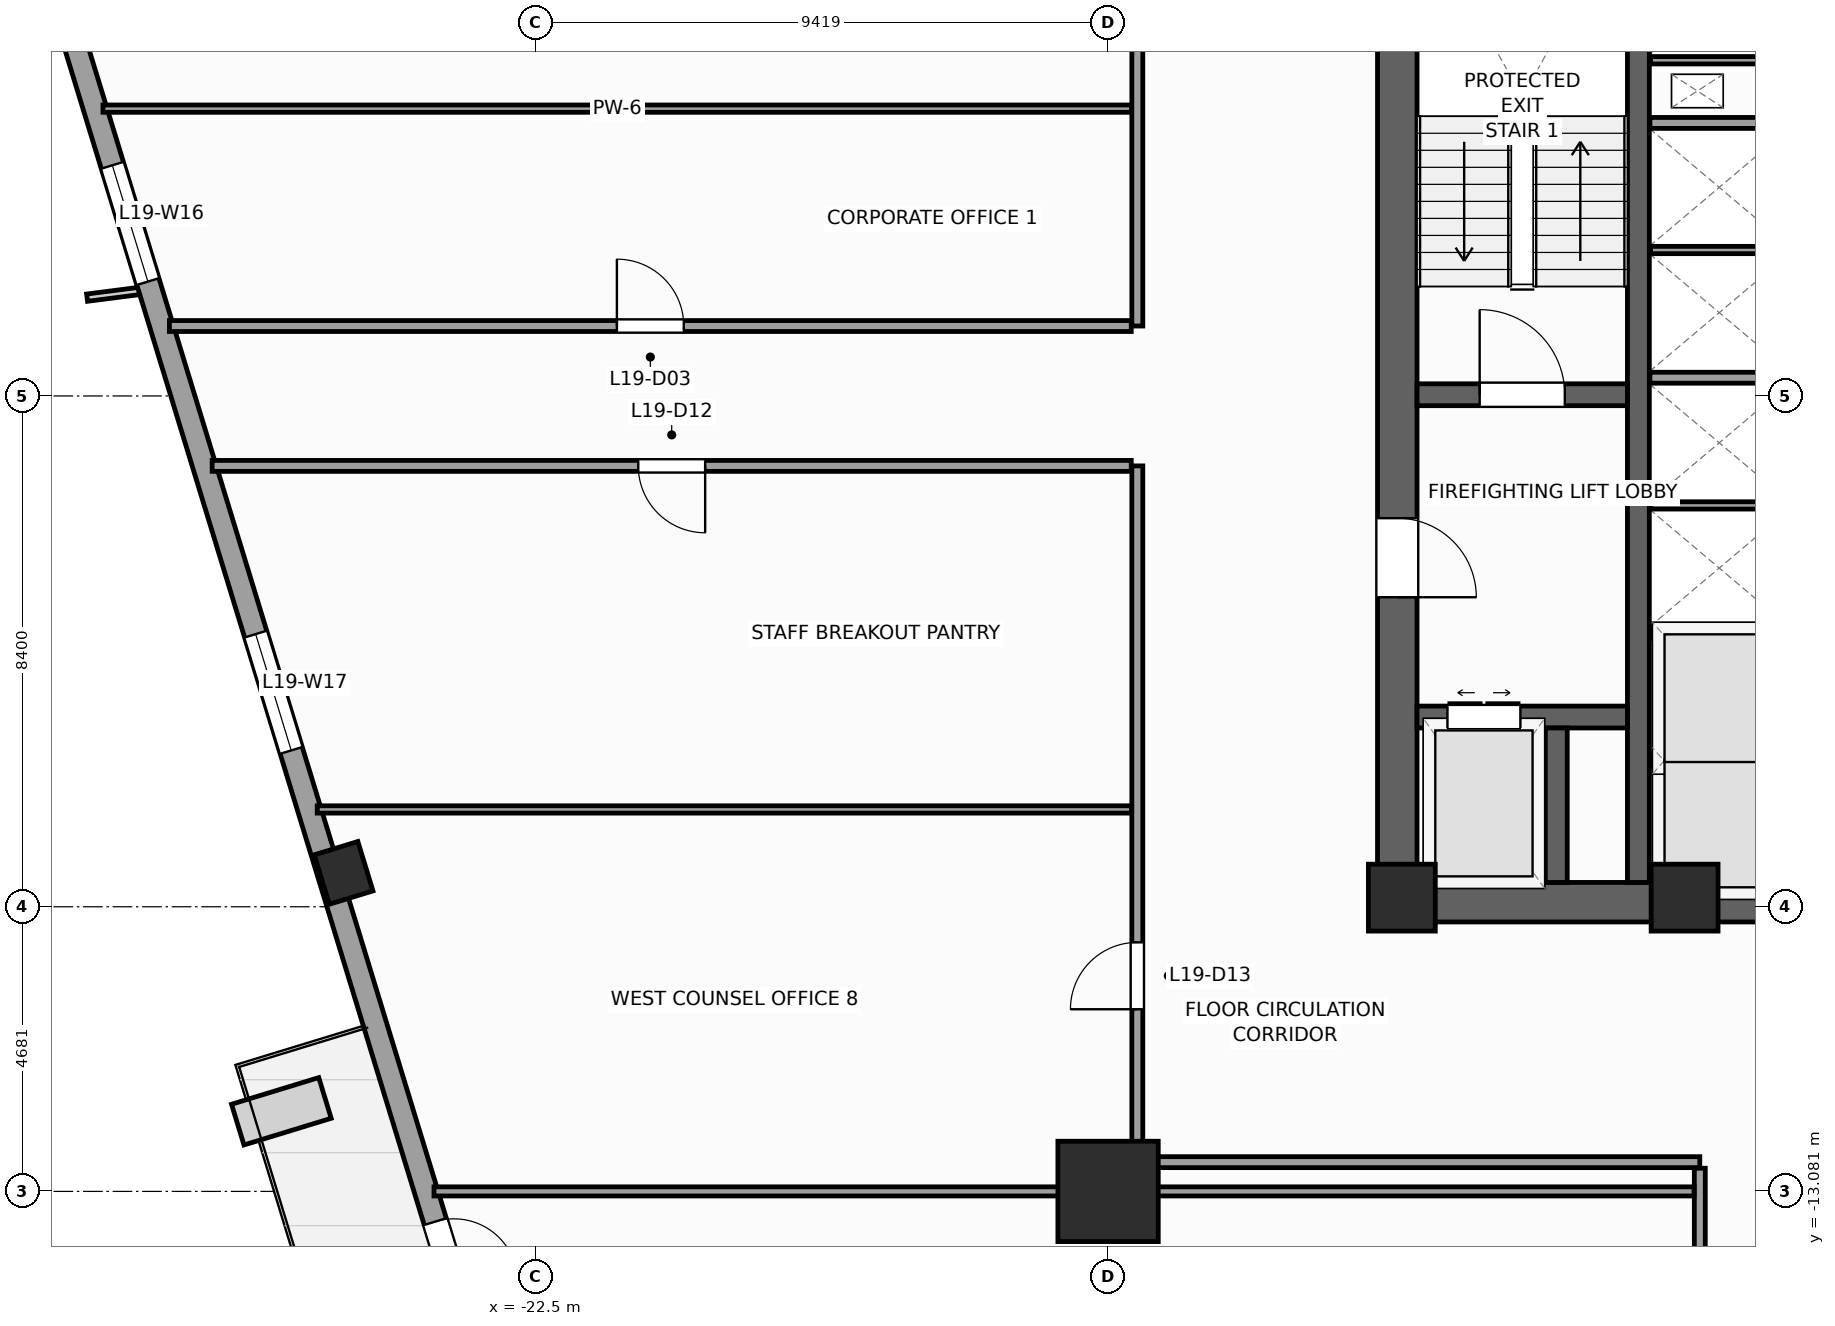
"""IFC4 building model, lengths in metres.
Left out: names, types, materials, properties, quantities, classifications, styles, units other than length and angle.
Written with IfcOpenShell. Run it as: python <this file> out.ifc"""

import sys

from ifc_helpers import new_model, si_unit, direction, frame, frame_2d, origin, origin_2d, place, context, subcontext, project, spatial, rectangle, extrude, source, transform, mapped, element, fill, save


model = new_model("IFC4")
c1 = context("Model", 3, precision=1e-05, world=origin(), true_north=direction((0.0, 1.0)))
c2 = subcontext(c1, "Body", "Model", "MODEL_VIEW")
j1 = project(units=[si_unit("LENGTHUNIT", "METRE"), si_unit("PLANEANGLEUNIT", "RADIAN")], contexts=[c1])
p1 = place(None, origin())
s1 = spatial("IfcSite", under=j1, at=p1, CompositionType="ELEMENT")
p2 = place(p1, origin())
s2 = spatial("IfcBuilding", under=s1, at=p2, CompositionType="ELEMENT")
p3 = place(p2, frame((0.0, 0.0, 83.2)))
s3 = spatial("IfcBuildingStorey", under=s2, at=p3, CompositionType="ELEMENT", Elevation=83.2)
p4 = place(p3, frame((-8.65, -8.325, 0.0), z_axis=(0.0, 0.0, 1.0), x_axis=(1.0, 0.0, 0.0)))
e1 = element("IfcWall", 1, at=p4, inside=s3, PredefinedType="SHEAR", context=c2, shape_type="SweptSolid", body=[
    extrude(rectangle(XDim=17.3, YDim=0.65, at=frame_2d((8.65, 0.0))), origin(), (0.0, 0.0, 1.0), 4.0),
])
p5 = place(p4, frame((8.0, 0.0, 0.0)))
e2 = element("IfcOpeningElement", 2, at=p5, cuts=e1, PredefinedType="OPENING", context=c2, shape_type="SweptSolid", body=[
    extrude(rectangle(XDim=1.3, YDim=2.2, at=frame_2d((0.65, 1.1))), frame((0.0, 0.335, 0.0), z_axis=(0.0, -1.0, 0.0), x_axis=(1.0, 0.0, 0.0)), (0.0, 0.0, 1.0), 0.67),
])
p6 = place(p3, frame((-8.325, -8.0, 0.0), z_axis=(0.0, 0.0, 1.0), x_axis=(0.0, 1.0, 0.0)))
e3 = element("IfcWall", 3, at=p6, inside=s3, PredefinedType="SHEAR", context=c2, shape_type="SweptSolid", body=[
    extrude(rectangle(XDim=16.0, YDim=0.65, at=frame_2d((8.0, 0.0))), origin(), (0.0, 0.0, 1.0), 4.0),
])
p7 = place(p6, frame((4.69, 0.0, 0.0)))
e4 = element("IfcOpeningElement", 4, at=p7, cuts=e3, PredefinedType="OPENING", context=c2, shape_type="SweptSolid", body=[
    extrude(rectangle(XDim=1.3, YDim=2.2, at=frame_2d((0.65, 1.1))), frame((0.0, 0.335, 0.0), z_axis=(0.0, -1.0, 0.0), x_axis=(1.0, 0.0, 0.0)), (0.0, 0.0, 1.0), 0.67),
])
p8 = place(p3, frame((-4.36, -8.0, 0.0), z_axis=(0.0, 0.0, 1.0), x_axis=(0.0, 1.0, 0.0)))
e5 = element("IfcWall", 5, at=p8, inside=s3, PredefinedType="SHEAR", context=c2, shape_type="SweptSolid", body=[
    extrude(rectangle(XDim=16.0, YDim=0.36, at=frame_2d((8.0, 0.0))), origin(), (0.0, 0.0, 1.0), 4.0),
])
p9 = place(p3, frame((-8.0, 0.02, 0.0), z_axis=(0.0, 0.0, 1.0), x_axis=(1.0, 0.0, 0.0)))
e6 = element("IfcWall", 6, at=p9, inside=s3, PredefinedType="SHEAR", context=c2, shape_type="SweptSolid", body=[
    extrude(rectangle(XDim=3.46, YDim=0.36, at=frame_2d((1.73, 0.0))), origin(), (0.0, 0.0, 1.0), 4.0),
])
p10 = place(p9, frame((1.03, 0.0, 0.0)))
e7 = element("IfcOpeningElement", 7, at=p10, cuts=e6, PredefinedType="OPENING", context=c2, shape_type="SweptSolid", body=[
    extrude(rectangle(XDim=1.4, YDim=2.2, at=frame_2d((0.7, 1.1))), frame((0.0, 0.19, 0.0), z_axis=(0.0, -1.0, 0.0), x_axis=(1.0, 0.0, 0.0)), (0.0, 0.0, 1.0), 0.38),
])
p11 = place(p3, frame((-8.0, -5.28, 0.0), z_axis=(0.0, 0.0, 1.0), x_axis=(1.0, 0.0, 0.0)))
e8 = element("IfcWall", 8, at=p11, inside=s3, PredefinedType="SHEAR", context=c2, shape_type="SweptSolid", body=[
    extrude(rectangle(XDim=3.46, YDim=0.36, at=frame_2d((1.73, 0.0))), origin(), (0.0, 0.0, 1.0), 4.0),
])
p12 = place(p11, frame((0.5, 0.0, 0.0)))
e9 = element("IfcOpeningElement", 9, at=p12, cuts=e8, PredefinedType="OPENING", context=c2, shape_type="SweptSolid", body=[
    extrude(rectangle(XDim=1.2, YDim=2.25, at=frame_2d((0.6, 1.125))), frame((0.0, 0.19, 0.0), z_axis=(0.0, -1.0, 0.0), x_axis=(1.0, 0.0, 0.0)), (0.0, 0.0, 1.0), 0.38),
])
p13 = place(p3, frame((-5.71, -8.0, 0.0), z_axis=(0.0, 0.0, 1.0), x_axis=(0.0, 1.0, 0.0)))
e10 = element("IfcWall", 10, at=p13, inside=s3, PredefinedType="SHEAR", context=c2, shape_type="SweptSolid", body=[
    extrude(rectangle(XDim=2.54, YDim=0.36, at=frame_2d((1.27, 0.0))), origin(), (0.0, 0.0, 1.0), 4.0),
])
m1 = source(origin(), c2, "Body", "SweptSolid", [
    extrude(rectangle(XDim=1.1, YDim=1.1, at=origin_2d()), origin(), (0.0, 0.0, 1.0), 4.0),
])
for number, where, z_axis, x_axis in (
    (11, (-8.25, -8.25, 0.0), (0.0, 0.0, 1.0), (1.0, 0.0, 0.0)),
    (12, (-3.6, -8.25, 0.0), (0.0, 0.0, 1.0), (1.0, 0.0, 0.0)),
):
    element("IfcColumn", number, at=place(p3, frame(where, z_axis=z_axis, x_axis=x_axis)), inside=s3, PredefinedType="PILASTER", context=c2, shape_type="MappedRepresentation", body=[
        mapped(m1, transform((0.0, 0.0, 0.0), scale=1.0)),
    ])
m2 = source(origin(), c2, "Body", "SweptSolid", [
    extrude(rectangle(XDim=1.65, YDim=1.65, at=origin_2d()), origin(), (0.0, 0.0, 1.0), 4.0),
])
p14 = place(p3, frame((-13.081, -13.081, 0.0), z_axis=(0.0, 0.0, 1.0), x_axis=(1.0, 0.0, 0.0)))
e13 = element("IfcColumn", 13, at=p14, inside=s3, PredefinedType="COLUMN", context=c2, shape_type="MappedRepresentation", body=[
    mapped(m2, transform((0.0, 0.0, 0.0), scale=1.0)),
])
m3 = source(origin(), c2, "Body", "SweptSolid", [
    extrude(rectangle(XDim=0.75, YDim=0.85, at=origin_2d()), origin(), (0.0, 0.0, 1.0), 4.0),
])
p15 = place(p3, frame((-25.653, -7.843, 0.0), z_axis=(0.0, 0.0, 1.0), x_axis=(0.956304755963, 0.292371704723, 0.0)))
e14 = element("IfcColumn", 14, at=p15, inside=s3, PredefinedType="COLUMN", context=c2, shape_type="MappedRepresentation", body=[
    mapped(m3, transform((0.0, 0.0, 0.0), scale=1.0)),
])
p16 = place(p3, frame((-32.658, 14.265, 0.0), z_axis=(0.0, 0.0, 1.0), x_axis=(0.292373127906, -0.956304320851, 0.0)))
e15 = element("IfcWall", 15, at=p16, inside=s3, PredefinedType="STANDARD", context=c2, shape_type="SweptSolid", body=[
    extrude(rectangle(XDim=46.38, YDim=0.38, at=frame_2d((23.19, 0.0))), origin(), (0.0, 0.0, 1.0), 3.14),
])
p17 = place(p16, frame((29.115, 0.0, 0.0)))
e16 = element("IfcOpeningElement", 16, at=p17, cuts=e15, PredefinedType="OPENING", context=c2, shape_type="SweptSolid", body=[
    extrude(rectangle(XDim=1.05, YDim=2.25, at=frame_2d((0.525, 1.125))), frame((0.0, 0.2, 0.0), z_axis=(0.0, -1.0, 0.0), x_axis=(1.0, 0.0, 0.0)), (0.0, 0.0, 1.0), 0.4),
])
p18 = place(p16, frame((4.865, 0.0, 0.51)))
e17 = element("IfcOpeningElement", 17, at=p18, cuts=e15, PredefinedType="OPENING", context=c2, shape_type="SweptSolid", body=[
    extrude(rectangle(XDim=1.4, YDim=2.4, at=frame_2d((0.7, 1.2))), frame((0.0, 0.2, 0.0), z_axis=(0.0, -1.0, 0.0), x_axis=(1.0, 0.0, 0.0)), (0.0, 0.0, 1.0), 0.4),
])
p19 = place(p16, frame((10.95, 0.0, 0.51)))
e18 = element("IfcOpeningElement", 18, at=p19, cuts=e15, PredefinedType="OPENING", context=c2, shape_type="SweptSolid", body=[
    extrude(rectangle(XDim=2.0, YDim=2.4, at=frame_2d((1.0, 1.2))), frame((0.0, 0.2, 0.0), z_axis=(0.0, -1.0, 0.0), x_axis=(1.0, 0.0, 0.0)), (0.0, 0.0, 1.0), 0.4),
])
p20 = place(p16, frame((19.012, 0.0, 0.51)))
e19 = element("IfcOpeningElement", 19, at=p20, cuts=e15, PredefinedType="OPENING", context=c2, shape_type="SweptSolid", body=[
    extrude(rectangle(XDim=2.0, YDim=2.4, at=frame_2d((1.0, 1.2))), frame((0.0, 0.2, 0.0), z_axis=(0.0, -1.0, 0.0), x_axis=(1.0, 0.0, 0.0)), (0.0, 0.0, 1.0), 0.4),
])
p21 = place(p16, frame((31.288, 0.0, 0.51)))
e20 = element("IfcOpeningElement", 20, at=p21, cuts=e15, PredefinedType="OPENING", context=c2, shape_type="SweptSolid", body=[
    extrude(rectangle(XDim=2.0, YDim=2.4, at=frame_2d((1.0, 1.2))), frame((0.0, 0.2, 0.0), z_axis=(0.0, -1.0, 0.0), x_axis=(1.0, 0.0, 0.0)), (0.0, 0.0, 1.0), 0.4),
])
p22 = place(p16, frame((39.187, 0.0, 0.51)))
e21 = element("IfcOpeningElement", 21, at=p22, cuts=e15, PredefinedType="OPENING", context=c2, shape_type="SweptSolid", body=[
    extrude(rectangle(XDim=1.4, YDim=2.4, at=frame_2d((0.7, 1.2))), frame((0.0, 0.2, 0.0), z_axis=(0.0, -1.0, 0.0), x_axis=(1.0, 0.0, 0.0)), (0.0, 0.0, 1.0), 0.4),
])
for number, where, z_axis, x_axis in (
    (22, (-4.17, -3.9, 0.0), (0.0, 0.0, 1.0), (1.0, 0.0, 0.0)),
    (23, (-4.17, 0.3, 0.0), (0.0, 0.0, 1.0), (1.0, 0.0, 0.0)),
    (24, (-4.17, 4.49, 0.0), (0.0, 0.0, 1.0), (1.0, 0.0, 0.0)),
):
    element("IfcWall", number, at=place(p3, frame(where, z_axis=z_axis, x_axis=x_axis)), inside=s3, PredefinedType="PARTITIONING", context=c2, shape_type="SweptSolid", body=[
        extrude(rectangle(XDim=2.28, YDim=0.18, at=frame_2d((1.14, 0.0))), origin(), (0.0, 0.0, 1.0), 3.74),
    ])
for number, where, z_axis, x_axis in (
    (25, (-4.16, -6.0, 0.0), (0.0, 0.0, 1.0), (1.0, 0.0, 0.0)),
    (26, (-4.16, -1.8, 0.0), (0.0, 0.0, 1.0), (1.0, 0.0, 0.0)),
    (27, (-4.16, 2.4, 0.0), (0.0, 0.0, 1.0), (1.0, 0.0, 0.0)),
):
    element("IfcWall", number, at=place(p3, frame(where, z_axis=z_axis, x_axis=x_axis)), inside=s3, PredefinedType="PARTITIONING", context=c2, shape_type="SweptSolid", body=[
        extrude(rectangle(XDim=2.26, YDim=0.12, at=frame_2d((1.13, 0.0))), origin(), (0.0, 0.0, 1.0), 3.74),
    ])
p23 = place(p3, frame((-4.16, 5.52, 0.0), z_axis=(0.0, 0.0, 1.0), x_axis=(1.0, 0.0, 0.0)))
e28 = element("IfcWall", 28, at=p23, inside=s3, PredefinedType="PARTITIONING", context=c2, shape_type="SweptSolid", body=[
    extrude(rectangle(XDim=2.1, YDim=0.12, at=frame_2d((1.05, 0.0))), origin(), (0.0, 0.0, 1.0), 3.74),
])
p24 = place(p3, frame((-12.6, -12.6, 0.0), z_axis=(0.0, 0.0, 1.0), x_axis=(1.0, 0.0, 0.0)))
e29 = element("IfcWall", 29, at=p24, inside=s3, PredefinedType="PARTITIONING", context=c2, shape_type="SweptSolid", body=[
    extrude(rectangle(XDim=9.25, YDim=0.18, at=frame_2d((4.625, 0.0))), origin(), (0.0, 0.0, 1.0), 3.74),
])
p25 = place(p3, frame((-12.6, -12.6, 0.0), z_axis=(0.0, 0.0, 1.0), x_axis=(0.0, 1.0, 0.0)))
e30 = element("IfcWall", 30, at=p25, inside=s3, PredefinedType="PARTITIONING", context=c2, shape_type="SweptSolid", body=[
    extrude(rectangle(XDim=11.45, YDim=0.18, at=frame_2d((5.725, 0.0))), origin(), (0.0, 0.0, 1.0), 3.74),
])
p26 = place(p25, frame((2.514, 0.0, 0.0)))
e31 = element("IfcOpeningElement", 31, at=p26, cuts=e30, PredefinedType="OPENING", context=c2, shape_type="SweptSolid", body=[
    extrude(rectangle(XDim=1.1, YDim=2.2, at=frame_2d((0.55, 1.1))), frame((0.0, 0.1, 0.0), z_axis=(0.0, -1.0, 0.0), x_axis=(1.0, 0.0, 0.0)), (0.0, 0.0, 1.0), 0.2),
])
p27 = place(p3, frame((-12.6, 1.15, 0.0), z_axis=(0.0, 0.0, 1.0), x_axis=(0.0, 1.0, 0.0)))
e32 = element("IfcWall", 32, at=p27, inside=s3, PredefinedType="PARTITIONING", context=c2, shape_type="SweptSolid", body=[
    extrude(rectangle(XDim=10.4, YDim=0.18, at=frame_2d((5.2, 0.0))), origin(), (0.0, 0.0, 1.0), 3.74),
])
p28 = place(p27, frame((4.812, 0.0, 0.0)))
e33 = element("IfcOpeningElement", 33, at=p28, cuts=e32, PredefinedType="OPENING", context=c2, shape_type="SweptSolid", body=[
    extrude(rectangle(XDim=1.1, YDim=2.2, at=frame_2d((0.55, 1.1))), frame((0.0, 0.1, 0.0), z_axis=(0.0, -1.0, 0.0), x_axis=(1.0, 0.0, 0.0)), (0.0, 0.0, 1.0), 0.2),
])
p29 = place(p3, frame((-27.814, -1.15, 0.0), z_axis=(0.0, 0.0, 1.0), x_axis=(1.0, 0.0, 0.0)))
e34 = element("IfcWall", 34, at=p29, inside=s3, PredefinedType="PARTITIONING", context=c2, shape_type="SweptSolid", body=[
    extrude(rectangle(XDim=15.114, YDim=0.18, at=frame_2d((7.557, 0.0))), origin(), (0.0, 0.0, 1.0), 3.74),
])
p30 = place(p29, frame((7.007, 0.0, 0.0)))
e35 = element("IfcOpeningElement", 35, at=p30, cuts=e34, PredefinedType="OPENING", context=c2, shape_type="SweptSolid", body=[
    extrude(rectangle(XDim=1.1, YDim=2.2, at=frame_2d((0.55, 1.1))), frame((0.0, 0.1, 0.0), z_axis=(0.0, -1.0, 0.0), x_axis=(1.0, 0.0, 0.0)), (0.0, 0.0, 1.0), 0.2),
])
p31 = place(p3, frame((-28.517, 1.15, 0.0), z_axis=(0.0, 0.0, 1.0), x_axis=(1.0, 0.0, 0.0)))
e36 = element("IfcWall", 36, at=p31, inside=s3, PredefinedType="PARTITIONING", context=c2, shape_type="SweptSolid", body=[
    extrude(rectangle(XDim=15.817, YDim=0.18, at=frame_2d((7.909, 0.0))), origin(), (0.0, 0.0, 1.0), 3.74),
])
p32 = place(p31, frame((7.359, 0.0, 0.0)))
e37 = element("IfcOpeningElement", 37, at=p32, cuts=e36, PredefinedType="OPENING", context=c2, shape_type="SweptSolid", body=[
    extrude(rectangle(XDim=1.1, YDim=2.2, at=frame_2d((0.55, 1.1))), frame((0.0, 0.1, 0.0), z_axis=(0.0, -1.0, 0.0), x_axis=(1.0, 0.0, 0.0)), (0.0, 0.0, 1.0), 0.2),
])
p33 = place(p3, frame((-3.35, -29.19, 0.0), z_axis=(0.0, 0.0, 1.0), x_axis=(0.0, 1.0, 0.0)))
e38 = element("IfcWall", 38, at=p33, inside=s3, PredefinedType="PARTITIONING", context=c2, shape_type="SweptSolid", body=[
    extrude(rectangle(XDim=16.49, YDim=0.18, at=frame_2d((8.245, 0.0))), origin(), (0.0, 0.0, 1.0), 3.74),
])
p34 = place(p33, frame((7.669, 0.0, 0.0)))
e39 = element("IfcOpeningElement", 39, at=p34, cuts=e38, PredefinedType="OPENING", context=c2, shape_type="SweptSolid", body=[
    extrude(rectangle(XDim=1.1, YDim=2.2, at=frame_2d((0.55, 1.1))), frame((0.0, 0.1, 0.0), z_axis=(0.0, -1.0, 0.0), x_axis=(1.0, 0.0, 0.0)), (0.0, 0.0, 1.0), 0.2),
])
p35 = place(p3, frame((-29.61, 4.725, 0.0), z_axis=(0.0, 0.0, 1.0), x_axis=(1.0, 0.0, 0.0)))
e40 = element("IfcWall", 40, at=p35, inside=s3, PredefinedType="PARTITIONING", context=c2, shape_type="SweptSolid", body=[
    extrude(rectangle(XDim=16.915, YDim=0.12, at=frame_2d((8.458, 0.0))), origin(), (0.0, 0.0, 1.0), 3.74),
])
p36 = place(p3, frame((-24.167, -13.081, 0.0), z_axis=(0.0, 0.0, 1.0), x_axis=(1.0, 0.0, 0.0)))
e41 = element("IfcWall", 41, at=p36, inside=s3, PredefinedType="PARTITIONING", context=c2, shape_type="SweptSolid", body=[
    extrude(rectangle(XDim=20.721, YDim=0.15, at=frame_2d((10.361, 0.0))), origin(), (0.0, 0.0, 1.0), 2.732),
])
p37 = place(p3, frame((-26.087, -6.8, 0.0), z_axis=(0.0, 0.0, 1.0), x_axis=(1.0, 0.0, 0.0)))
e42 = element("IfcWall", 42, at=p37, inside=s3, PredefinedType="PARTITIONING", context=c2, shape_type="SweptSolid", body=[
    extrude(rectangle(XDim=13.392, YDim=0.12, at=frame_2d((6.696, 0.0))), origin(), (0.0, 0.0, 1.0), 3.74),
])
m4 = source(origin(), c2, "Body", "SweptSolid", [
    extrude(rectangle(XDim=1.05, YDim=2.25, at=frame_2d((0.525, 1.125))), frame((0.0, 0.025, 0.0), z_axis=(0.0, -1.0, 0.0), x_axis=(1.0, 0.0, 0.0)), (0.0, 0.0, 1.0), 0.05),
])
p38 = place(p17, origin())
e43 = element("IfcDoor", 43, at=p38, inside=s3, OperationType="SINGLE_SWING_RIGHT", PredefinedType="DOOR", context=c2, shape_type="MappedRepresentation", body=[
    mapped(m4, transform((0.0, 0.0, 0.0), scale=1.0)),
])
fill(e16, e43)
m5 = source(origin(), c2, "Body", "SweptSolid", [
    extrude(rectangle(XDim=2.0, YDim=2.4, at=frame_2d((1.0, 1.2))), frame((0.0, 0.03, 0.0), z_axis=(0.0, -1.0, 0.0), x_axis=(1.0, 0.0, 0.0)), (0.0, 0.0, 1.0), 0.06),
])
p39 = place(p19, origin())
e44 = element("IfcWindow", 44, at=p39, inside=s3, PartitioningType="SINGLE_PANEL", PredefinedType="WINDOW", context=c2, shape_type="MappedRepresentation", body=[
    mapped(m5, transform((0.0, 0.0, 0.0), scale=1.0)),
])
fill(e18, e44)
p40 = place(p20, origin())
e45 = element("IfcWindow", 45, at=p40, inside=s3, PartitioningType="SINGLE_PANEL", PredefinedType="WINDOW", context=c2, shape_type="MappedRepresentation", body=[
    mapped(m5, transform((0.0, 0.0, 0.0), scale=1.0)),
])
fill(e19, e45)
m6 = source(origin(), c2, "Body", "SweptSolid", [
    extrude(rectangle(XDim=1.4, YDim=2.2, at=frame_2d((0.7, 1.1))), frame((0.0, 0.025, 0.0), z_axis=(0.0, -1.0, 0.0), x_axis=(1.0, 0.0, 0.0)), (0.0, 0.0, 1.0), 0.05),
])
p41 = place(p10, origin())
e46 = element("IfcDoor", 46, at=p41, inside=s3, OperationType="SINGLE_SWING_LEFT", PredefinedType="DOOR", context=c2, shape_type="MappedRepresentation", body=[
    mapped(m6, transform((0.0, 0.0, 0.0), scale=1.0)),
])
fill(e7, e46)
m7 = source(origin(), c2, "Body", "SweptSolid", [
    extrude(rectangle(XDim=1.3, YDim=2.2, at=frame_2d((0.65, 1.1))), frame((0.0, 0.025, 0.0), z_axis=(0.0, -1.0, 0.0), x_axis=(1.0, 0.0, 0.0)), (0.0, 0.0, 1.0), 0.05),
])
p42 = place(p7, frame((1.3, 0.0, 0.0), z_axis=(0.0, 0.0, 1.0), x_axis=(-1.0, 0.0, 0.0)))
e47 = element("IfcDoor", 47, at=p42, inside=s3, OperationType="SINGLE_SWING_LEFT", PredefinedType="DOOR", context=c2, shape_type="MappedRepresentation", body=[
    mapped(m7, transform((0.0, 0.0, 0.0), scale=1.0)),
])
fill(e4, e47)
m8 = source(origin(), c2, "Body", "SweptSolid", [
    extrude(rectangle(XDim=1.2, YDim=2.25, at=frame_2d((0.6, 1.125))), frame((0.0, 0.025, 0.0), z_axis=(0.0, -1.0, 0.0), x_axis=(1.0, 0.0, 0.0)), (0.0, 0.0, 1.0), 0.05),
])
p43 = place(p12, origin())
e48 = element("IfcDoor", 48, at=p43, inside=s3, OperationType="DOUBLE_DOOR_SLIDING", PredefinedType="DOOR", context=c2, shape_type="MappedRepresentation", body=[
    mapped(m8, transform((0.0, 0.0, 0.0), scale=1.0)),
])
fill(e9, e48)
m9 = source(origin(), c2, "Body", "SweptSolid", [
    extrude(rectangle(XDim=1.1, YDim=2.2, at=frame_2d((0.55, 1.1))), frame((0.0, 0.025, 0.0), z_axis=(0.0, -1.0, 0.0), x_axis=(1.0, 0.0, 0.0)), (0.0, 0.0, 1.0), 0.05),
])
p44 = place(p32, origin())
e49 = element("IfcDoor", 49, at=p44, inside=s3, OperationType="SINGLE_SWING_LEFT", PredefinedType="DOOR", context=c2, shape_type="MappedRepresentation", body=[
    mapped(m9, transform((0.0, 0.0, 0.0), scale=1.0)),
])
fill(e37, e49)
p45 = place(p30, frame((1.1, 0.0, 0.0), z_axis=(0.0, 0.0, 1.0), x_axis=(-1.0, 0.0, 0.0)))
e50 = element("IfcDoor", 50, at=p45, inside=s3, OperationType="SINGLE_SWING_RIGHT", PredefinedType="DOOR", context=c2, shape_type="MappedRepresentation", body=[
    mapped(m9, transform((0.0, 0.0, 0.0), scale=1.0)),
])
fill(e35, e50)
p46 = place(p26, origin())
e51 = element("IfcDoor", 51, at=p46, inside=s3, OperationType="SINGLE_SWING_LEFT", PredefinedType="DOOR", context=c2, shape_type="MappedRepresentation", body=[
    mapped(m9, transform((0.0, 0.0, 0.0), scale=1.0)),
])
fill(e31, e51)
save(model, sys.argv[1])
